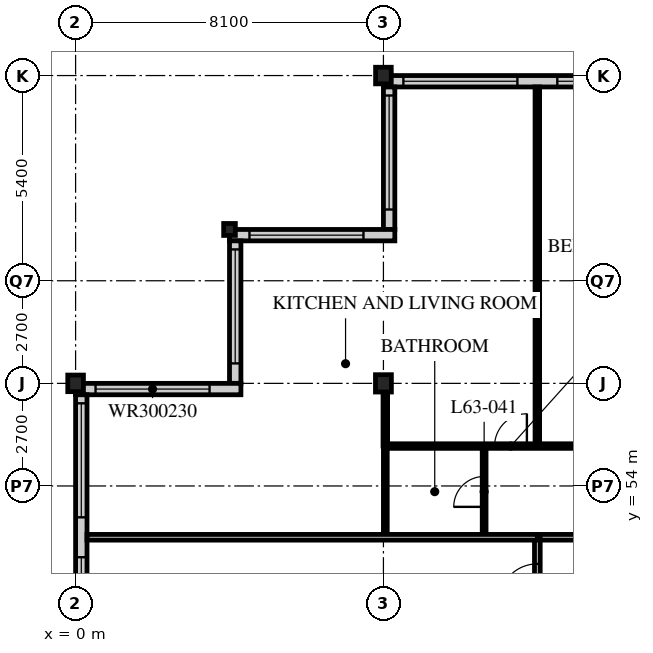
"""IFC4 building model, lengths in metres.
Left out: names, types, materials, properties, quantities, classifications, styles, units other than length and angle.
Written with IfcOpenShell. Run it as: python <this file> out.ifc"""

import sys

from ifc_helpers import new_model, si_unit, direction, frame, frame_2d, origin, origin_2d, place, context, subcontext, project, spatial, rectangle, i_section, extrude, element, fill, save


model = new_model("IFC4")
c1 = context("Model", 3, precision=1e-05, world=origin(), true_north=direction((0.0, 1.0)))
c2 = subcontext(c1, "Body", "Model", "MODEL_VIEW")
j1 = project(units=[si_unit("LENGTHUNIT", "METRE"), si_unit("PLANEANGLEUNIT", "RADIAN")], contexts=[c1])
p1 = place(None, origin())
s1 = spatial("IfcSite", under=j1, at=p1, CompositionType="ELEMENT")
p2 = place(p1, origin())
s2 = spatial("IfcBuilding", under=s1, at=p2, CompositionType="ELEMENT")
p3 = place(p2, frame((0.0, 0.0, 246.3)))
s3 = spatial("IfcBuildingStorey", under=s2, at=p3, CompositionType="ELEMENT", Elevation=246.3)
p4 = place(p3, frame((0.0, 56.7, 0.0), z_axis=(0.0, 0.0, 1.0), x_axis=(1.0, 0.0, 0.0)))
e1 = element("IfcColumn", 1, at=p4, inside=s3, PredefinedType="COLUMN", context=c2, shape_type="SweptSolid", body=[
    extrude(i_section(OverallWidth=0.412, OverallDepth=0.437, WebThickness=0.036, FlangeThickness=0.058, FilletRadius=0.015, at=origin_2d()), origin(), (0.0, 0.0, 1.0), 3.9),
])
p5 = place(p3, frame((4.05, 60.75, 0.0), z_axis=(0.0, 0.0, 1.0), x_axis=(1.0, 0.0, 0.0)))
e2 = element("IfcColumn", 2, at=p5, inside=s3, PredefinedType="COLUMN", context=c2, shape_type="SweptSolid", body=[
    extrude(i_section(OverallWidth=0.307, OverallDepth=0.314, WebThickness=0.012, FlangeThickness=0.019, FilletRadius=0.015, at=origin_2d()), origin(), (0.0, 0.0, 1.0), 3.9),
])
p6 = place(p3, frame((8.1, 56.7, 0.0), z_axis=(0.0, 0.0, 1.0), x_axis=(1.0, 0.0, 0.0)))
e3 = element("IfcColumn", 3, at=p6, inside=s3, PredefinedType="COLUMN", context=c2, shape_type="SweptSolid", body=[
    extrude(i_section(OverallWidth=0.418, OverallDepth=0.456, WebThickness=0.042, FlangeThickness=0.067, FilletRadius=0.015, at=origin_2d()), origin(), (0.0, 0.0, 1.0), 3.9),
])
p7 = place(p3, frame((8.1, 64.8, 0.0), z_axis=(0.0, 0.0, 1.0), x_axis=(1.0, 0.0, 0.0)))
e4 = element("IfcColumn", 4, at=p7, inside=s3, PredefinedType="COLUMN", context=c2, shape_type="SweptSolid", body=[
    extrude(i_section(OverallWidth=0.412, OverallDepth=0.437, WebThickness=0.036, FlangeThickness=0.058, FilletRadius=0.015, at=origin_2d()), origin(), (0.0, 0.0, 1.0), 3.9),
])
p8 = place(p3, frame((48.3, 64.65, 0.0), z_axis=(0.0, 0.0, 1.0), x_axis=(-1.0, 0.0, 0.0)))
e5 = element("IfcWall", 5, at=p8, inside=s3, PredefinedType="SOLIDWALL", context=c2, shape_type="SweptSolid", body=[
    extrude(rectangle(XDim=40.2, YDim=0.3, at=frame_2d((20.1, 0.0))), origin(), (0.0, 0.0, 1.0), 3.69),
])
p9 = place(p8, frame((0.225, 0.0, 0.6)))
e6 = element("IfcOpeningElement", 6, at=p9, cuts=e5, PredefinedType="OPENING", context=c2, shape_type="SweptSolid", body=[
    extrude(rectangle(XDim=3.0, YDim=2.4, at=frame_2d((1.5, 1.2))), frame((0.0, 0.16, 0.0), z_axis=(0.0, -1.0, 0.0), x_axis=(1.0, 0.0, 0.0)), (0.0, 0.0, 1.0), 0.32),
])
p10 = place(p8, frame((4.275, 0.0, 0.6)))
e7 = element("IfcOpeningElement", 7, at=p10, cuts=e5, PredefinedType="OPENING", context=c2, shape_type="SweptSolid", body=[
    extrude(rectangle(XDim=3.0, YDim=2.4, at=frame_2d((1.5, 1.2))), frame((0.0, 0.16, 0.0), z_axis=(0.0, -1.0, 0.0), x_axis=(1.0, 0.0, 0.0)), (0.0, 0.0, 1.0), 0.32),
])
p11 = place(p8, frame((8.325, 0.0, 0.6)))
e8 = element("IfcOpeningElement", 8, at=p11, cuts=e5, PredefinedType="OPENING", context=c2, shape_type="SweptSolid", body=[
    extrude(rectangle(XDim=3.0, YDim=2.4, at=frame_2d((1.5, 1.2))), frame((0.0, 0.16, 0.0), z_axis=(0.0, -1.0, 0.0), x_axis=(1.0, 0.0, 0.0)), (0.0, 0.0, 1.0), 0.32),
])
p12 = place(p8, frame((12.375, 0.0, 0.6)))
e9 = element("IfcOpeningElement", 9, at=p12, cuts=e5, PredefinedType="OPENING", context=c2, shape_type="SweptSolid", body=[
    extrude(rectangle(XDim=3.0, YDim=2.4, at=frame_2d((1.5, 1.2))), frame((0.0, 0.16, 0.0), z_axis=(0.0, -1.0, 0.0), x_axis=(1.0, 0.0, 0.0)), (0.0, 0.0, 1.0), 0.32),
])
p13 = place(p8, frame((16.425, 0.0, 0.6)))
e10 = element("IfcOpeningElement", 10, at=p13, cuts=e5, PredefinedType="OPENING", context=c2, shape_type="SweptSolid", body=[
    extrude(rectangle(XDim=3.0, YDim=2.4, at=frame_2d((1.5, 1.2))), frame((0.0, 0.16, 0.0), z_axis=(0.0, -1.0, 0.0), x_axis=(1.0, 0.0, 0.0)), (0.0, 0.0, 1.0), 0.32),
])
p14 = place(p8, frame((20.475, 0.0, 0.6)))
e11 = element("IfcOpeningElement", 11, at=p14, cuts=e5, PredefinedType="OPENING", context=c2, shape_type="SweptSolid", body=[
    extrude(rectangle(XDim=3.0, YDim=2.4, at=frame_2d((1.5, 1.2))), frame((0.0, 0.16, 0.0), z_axis=(0.0, -1.0, 0.0), x_axis=(1.0, 0.0, 0.0)), (0.0, 0.0, 1.0), 0.32),
])
p15 = place(p8, frame((24.525, 0.0, 0.6)))
e12 = element("IfcOpeningElement", 12, at=p15, cuts=e5, PredefinedType="OPENING", context=c2, shape_type="SweptSolid", body=[
    extrude(rectangle(XDim=3.0, YDim=2.4, at=frame_2d((1.5, 1.2))), frame((0.0, 0.16, 0.0), z_axis=(0.0, -1.0, 0.0), x_axis=(1.0, 0.0, 0.0)), (0.0, 0.0, 1.0), 0.32),
])
p16 = place(p8, frame((28.575, 0.0, 0.6)))
e13 = element("IfcOpeningElement", 13, at=p16, cuts=e5, PredefinedType="OPENING", context=c2, shape_type="SweptSolid", body=[
    extrude(rectangle(XDim=3.0, YDim=2.4, at=frame_2d((1.5, 1.2))), frame((0.0, 0.16, 0.0), z_axis=(0.0, -1.0, 0.0), x_axis=(1.0, 0.0, 0.0)), (0.0, 0.0, 1.0), 0.32),
])
p17 = place(p8, frame((32.625, 0.0, 0.6)))
e14 = element("IfcOpeningElement", 14, at=p17, cuts=e5, PredefinedType="OPENING", context=c2, shape_type="SweptSolid", body=[
    extrude(rectangle(XDim=3.0, YDim=2.4, at=frame_2d((1.5, 1.2))), frame((0.0, 0.16, 0.0), z_axis=(0.0, -1.0, 0.0), x_axis=(1.0, 0.0, 0.0)), (0.0, 0.0, 1.0), 0.32),
])
p18 = place(p8, frame((36.675, 0.0, 0.6)))
e15 = element("IfcOpeningElement", 15, at=p18, cuts=e5, PredefinedType="OPENING", context=c2, shape_type="SweptSolid", body=[
    extrude(rectangle(XDim=3.0, YDim=2.4, at=frame_2d((1.5, 1.2))), frame((0.0, 0.16, 0.0), z_axis=(0.0, -1.0, 0.0), x_axis=(1.0, 0.0, 0.0)), (0.0, 0.0, 1.0), 0.32),
])
p19 = place(p3, frame((8.25, 64.5, 0.0), z_axis=(0.0, 0.0, 1.0), x_axis=(0.0, -1.0, 0.0)))
e16 = element("IfcWall", 16, at=p19, inside=s3, PredefinedType="SOLIDWALL", context=c2, shape_type="SweptSolid", body=[
    extrude(rectangle(XDim=3.75, YDim=0.3, at=frame_2d((1.875, 0.0))), origin(), (0.0, 0.0, 1.0), 3.69),
])
p20 = place(p19, frame((0.225, 0.0, 0.6)))
e17 = element("IfcOpeningElement", 17, at=p20, cuts=e16, PredefinedType="OPENING", context=c2, shape_type="SweptSolid", body=[
    extrude(rectangle(XDim=3.0, YDim=2.3, at=frame_2d((1.5, 1.15))), frame((0.0, 0.16, 0.0), z_axis=(0.0, -1.0, 0.0), x_axis=(1.0, 0.0, 0.0)), (0.0, 0.0, 1.0), 0.32),
])
p21 = place(p3, frame((8.4, 60.6, 0.0), z_axis=(0.0, 0.0, 1.0), x_axis=(-1.0, 0.0, 0.0)))
e18 = element("IfcWall", 18, at=p21, inside=s3, PredefinedType="SOLIDWALL", context=c2, shape_type="SweptSolid", body=[
    extrude(rectangle(XDim=4.35, YDim=0.3, at=frame_2d((2.175, 0.0))), origin(), (0.0, 0.0, 1.0), 3.69),
])
p22 = place(p21, frame((0.825, 0.0, 0.6)))
e19 = element("IfcOpeningElement", 19, at=p22, cuts=e18, PredefinedType="OPENING", context=c2, shape_type="SweptSolid", body=[
    extrude(rectangle(XDim=3.0, YDim=2.3, at=frame_2d((1.5, 1.15))), frame((0.0, 0.16, 0.0), z_axis=(0.0, -1.0, 0.0), x_axis=(1.0, 0.0, 0.0)), (0.0, 0.0, 1.0), 0.32),
])
p23 = place(p3, frame((4.2, 60.45, 0.0), z_axis=(0.0, 0.0, 1.0), x_axis=(0.0, -1.0, 0.0)))
e20 = element("IfcWall", 20, at=p23, inside=s3, PredefinedType="SOLIDWALL", context=c2, shape_type="SweptSolid", body=[
    extrude(rectangle(XDim=3.75, YDim=0.3, at=frame_2d((1.875, 0.0))), origin(), (0.0, 0.0, 1.0), 3.69),
])
p24 = place(p23, frame((0.225, 0.0, 0.6)))
e21 = element("IfcOpeningElement", 21, at=p24, cuts=e20, PredefinedType="OPENING", context=c2, shape_type="SweptSolid", body=[
    extrude(rectangle(XDim=3.0, YDim=2.3, at=frame_2d((1.5, 1.15))), frame((0.0, 0.16, 0.0), z_axis=(0.0, -1.0, 0.0), x_axis=(1.0, 0.0, 0.0)), (0.0, 0.0, 1.0), 0.32),
])
p25 = place(p3, frame((4.35, 56.55, 0.0), z_axis=(0.0, 0.0, 1.0), x_axis=(-1.0, 0.0, 0.0)))
e22 = element("IfcWall", 22, at=p25, inside=s3, PredefinedType="SOLIDWALL", context=c2, shape_type="SweptSolid", body=[
    extrude(rectangle(XDim=4.35, YDim=0.3, at=frame_2d((2.175, 0.0))), origin(), (0.0, 0.0, 1.0), 3.69),
])
p26 = place(p25, frame((0.825, 0.0, 0.6)))
e23 = element("IfcOpeningElement", 23, at=p26, cuts=e22, PredefinedType="OPENING", context=c2, shape_type="SweptSolid", body=[
    extrude(rectangle(XDim=3.0, YDim=2.3, at=frame_2d((1.5, 1.15))), frame((0.0, 0.16, 0.0), z_axis=(0.0, -1.0, 0.0), x_axis=(1.0, 0.0, 0.0)), (0.0, 0.0, 1.0), 0.32),
])
p27 = place(p3, frame((0.15, 56.4, 0.0), z_axis=(0.0, 0.0, 1.0), x_axis=(0.0, -1.0, 0.0)))
e24 = element("IfcWall", 24, at=p27, inside=s3, PredefinedType="SOLIDWALL", context=c2, shape_type="SweptSolid", body=[
    extrude(rectangle(XDim=32.1, YDim=0.3, at=frame_2d((16.05, 0.0))), origin(), (0.0, 0.0, 1.0), 3.69),
])
p28 = place(p27, frame((0.225, 0.0, 0.6)))
e25 = element("IfcOpeningElement", 25, at=p28, cuts=e24, PredefinedType="OPENING", context=c2, shape_type="SweptSolid", body=[
    extrude(rectangle(XDim=3.0, YDim=2.4, at=frame_2d((1.5, 1.2))), frame((0.0, 0.16, 0.0), z_axis=(0.0, -1.0, 0.0), x_axis=(1.0, 0.0, 0.0)), (0.0, 0.0, 1.0), 0.32),
])
p29 = place(p27, frame((4.275, 0.0, 0.6)))
e26 = element("IfcOpeningElement", 26, at=p29, cuts=e24, PredefinedType="OPENING", context=c2, shape_type="SweptSolid", body=[
    extrude(rectangle(XDim=3.0, YDim=2.4, at=frame_2d((1.5, 1.2))), frame((0.0, 0.16, 0.0), z_axis=(0.0, -1.0, 0.0), x_axis=(1.0, 0.0, 0.0)), (0.0, 0.0, 1.0), 0.32),
])
p30 = place(p27, frame((8.325, 0.0, 0.6)))
e27 = element("IfcOpeningElement", 27, at=p30, cuts=e24, PredefinedType="OPENING", context=c2, shape_type="SweptSolid", body=[
    extrude(rectangle(XDim=3.0, YDim=2.4, at=frame_2d((1.5, 1.2))), frame((0.0, 0.16, 0.0), z_axis=(0.0, -1.0, 0.0), x_axis=(1.0, 0.0, 0.0)), (0.0, 0.0, 1.0), 0.32),
])
p31 = place(p27, frame((12.375, 0.0, 0.6)))
e28 = element("IfcOpeningElement", 28, at=p31, cuts=e24, PredefinedType="OPENING", context=c2, shape_type="SweptSolid", body=[
    extrude(rectangle(XDim=3.0, YDim=2.4, at=frame_2d((1.5, 1.2))), frame((0.0, 0.16, 0.0), z_axis=(0.0, -1.0, 0.0), x_axis=(1.0, 0.0, 0.0)), (0.0, 0.0, 1.0), 0.32),
])
p32 = place(p27, frame((16.425, 0.0, 0.6)))
e29 = element("IfcOpeningElement", 29, at=p32, cuts=e24, PredefinedType="OPENING", context=c2, shape_type="SweptSolid", body=[
    extrude(rectangle(XDim=3.0, YDim=2.4, at=frame_2d((1.5, 1.2))), frame((0.0, 0.16, 0.0), z_axis=(0.0, -1.0, 0.0), x_axis=(1.0, 0.0, 0.0)), (0.0, 0.0, 1.0), 0.32),
])
p33 = place(p27, frame((20.475, 0.0, 0.6)))
e30 = element("IfcOpeningElement", 30, at=p33, cuts=e24, PredefinedType="OPENING", context=c2, shape_type="SweptSolid", body=[
    extrude(rectangle(XDim=3.0, YDim=2.4, at=frame_2d((1.5, 1.2))), frame((0.0, 0.16, 0.0), z_axis=(0.0, -1.0, 0.0), x_axis=(1.0, 0.0, 0.0)), (0.0, 0.0, 1.0), 0.32),
])
p34 = place(p27, frame((24.525, 0.0, 0.6)))
e31 = element("IfcOpeningElement", 31, at=p34, cuts=e24, PredefinedType="OPENING", context=c2, shape_type="SweptSolid", body=[
    extrude(rectangle(XDim=3.0, YDim=2.4, at=frame_2d((1.5, 1.2))), frame((0.0, 0.16, 0.0), z_axis=(0.0, -1.0, 0.0), x_axis=(1.0, 0.0, 0.0)), (0.0, 0.0, 1.0), 0.32),
])
p35 = place(p27, frame((28.575, 0.0, 0.6)))
e32 = element("IfcOpeningElement", 32, at=p35, cuts=e24, PredefinedType="OPENING", context=c2, shape_type="SweptSolid", body=[
    extrude(rectangle(XDim=3.0, YDim=2.4, at=frame_2d((1.5, 1.2))), frame((0.0, 0.16, 0.0), z_axis=(0.0, -1.0, 0.0), x_axis=(1.0, 0.0, 0.0)), (0.0, 0.0, 1.0), 0.32),
])
p36 = place(p3, frame((12.15, 52.65, 0.0), z_axis=(0.0, 0.0, 1.0), x_axis=(1.0, 0.0, 0.0)))
e33 = element("IfcWall", 33, at=p36, inside=s3, PredefinedType="PARTITIONING", context=c2, shape_type="SweptSolid", body=[
    extrude(rectangle(XDim=24.3, YDim=0.15, at=frame_2d((12.15, 0.0))), origin(), (0.0, 0.0, 1.0), 3.69),
])
p37 = place(p36, frame((4.45, 0.0, 0.0)))
e34 = element("IfcOpeningElement", 34, at=p37, cuts=e33, PredefinedType="OPENING", context=c2, shape_type="SweptSolid", body=[
    extrude(rectangle(XDim=1.0, YDim=2.1, at=frame_2d((0.5, 1.05))), frame((0.0, 0.085, 0.0), z_axis=(0.0, -1.0, 0.0), x_axis=(1.0, 0.0, 0.0)), (0.0, 0.0, 1.0), 0.17),
])
p38 = place(p36, frame((1.525, 0.0, 0.0)))
e35 = element("IfcOpeningElement", 35, at=p38, cuts=e33, PredefinedType="OPENING", context=c2, shape_type="SweptSolid", body=[
    extrude(rectangle(XDim=1.0, YDim=2.1, at=frame_2d((0.5, 1.05))), frame((0.0, 0.085, 0.0), z_axis=(0.0, -1.0, 0.0), x_axis=(1.0, 0.0, 0.0)), (0.0, 0.0, 1.0), 0.17),
])
p39 = place(p3, frame((12.15, 22.5, 0.0), z_axis=(0.0, 0.0, 1.0), x_axis=(0.0, 1.0, 0.0)))
e36 = element("IfcWall", 36, at=p39, inside=s3, PredefinedType="PARTITIONING", context=c2, shape_type="SweptSolid", body=[
    extrude(rectangle(XDim=30.15, YDim=0.15, at=frame_2d((15.075, 0.0))), origin(), (0.0, 0.0, 1.0), 3.69),
])
p40 = place(p39, frame((0.4, 0.0, 0.0)))
e37 = element("IfcOpeningElement", 37, at=p40, cuts=e36, PredefinedType="OPENING", context=c2, shape_type="SweptSolid", body=[
    extrude(rectangle(XDim=1.0, YDim=2.1, at=frame_2d((0.5, 1.05))), frame((0.0, 0.085, 0.0), z_axis=(0.0, -1.0, 0.0), x_axis=(1.0, 0.0, 0.0)), (0.0, 0.0, 1.0), 0.17),
])
p41 = place(p39, frame((24.4, 0.0, 0.0)))
e38 = element("IfcOpeningElement", 38, at=p41, cuts=e36, PredefinedType="OPENING", context=c2, shape_type="SweptSolid", body=[
    extrude(rectangle(XDim=1.0, YDim=2.1, at=frame_2d((0.5, 1.05))), frame((0.0, 0.085, 0.0), z_axis=(0.0, -1.0, 0.0), x_axis=(1.0, 0.0, 0.0)), (0.0, 0.0, 1.0), 0.17),
])
p42 = place(p39, frame((28.45, 0.0, 0.0)))
e39 = element("IfcOpeningElement", 39, at=p42, cuts=e36, PredefinedType="OPENING", context=c2, shape_type="SweptSolid", body=[
    extrude(rectangle(XDim=1.0, YDim=2.1, at=frame_2d((0.5, 1.05))), frame((0.0, 0.085, 0.0), z_axis=(0.0, -1.0, 0.0), x_axis=(1.0, 0.0, 0.0)), (0.0, 0.0, 1.0), 0.17),
])
p43 = place(p3, frame((10.75, 52.65, 0.0), z_axis=(0.0, 0.0, 1.0), x_axis=(0.0, 1.0, 0.0)))
e40 = element("IfcWall", 40, at=p43, inside=s3, PredefinedType="PARTITIONING", context=c2, shape_type="SweptSolid", body=[
    extrude(rectangle(XDim=2.4, YDim=0.1, at=frame_2d((1.2, 0.0))), origin(), (0.0, 0.0, 1.0), 3.69),
])
p44 = place(p43, frame((0.8, 0.0, 0.0)))
e41 = element("IfcOpeningElement", 41, at=p44, cuts=e40, PredefinedType="OPENING", context=c2, shape_type="SweptSolid", body=[
    extrude(rectangle(XDim=0.8, YDim=2.1, at=frame_2d((0.4, 1.05))), frame((0.0, 0.06, 0.0), z_axis=(0.0, -1.0, 0.0), x_axis=(1.0, 0.0, 0.0)), (0.0, 0.0, 1.0), 0.12),
])
p45 = place(p3, frame((8.15, 52.65, 0.0), z_axis=(0.0, 0.0, 1.0), x_axis=(0.0, 1.0, 0.0)))
e42 = element("IfcWall", 42, at=p45, inside=s3, PredefinedType="PARTITIONING", context=c2, shape_type="SweptSolid", body=[
    extrude(rectangle(XDim=2.4, YDim=0.1, at=frame_2d((1.2, 0.0))), origin(), (0.0, 0.0, 1.0), 3.078),
])
p46 = place(p3, frame((8.15, 55.05, 0.0), z_axis=(0.0, 0.0, 1.0), x_axis=(1.0, 0.0, 0.0)))
e43 = element("IfcWall", 43, at=p46, inside=s3, PredefinedType="PARTITIONING", context=c2, shape_type="SweptSolid", body=[
    extrude(rectangle(XDim=28.3, YDim=0.12, at=frame_2d((14.15, 0.0))), origin(), (0.0, 0.0, 1.0), 3.69),
])
p47 = place(p46, frame((9.025, 0.0, 0.0)))
e44 = element("IfcOpeningElement", 44, at=p47, cuts=e43, PredefinedType="OPENING", context=c2, shape_type="SweptSolid", body=[
    extrude(rectangle(XDim=0.85, YDim=2.1, at=frame_2d((0.425, 1.05))), frame((0.0, 0.07, 0.0), z_axis=(0.0, -1.0, 0.0), x_axis=(1.0, 0.0, 0.0)), (0.0, 0.0, 1.0), 0.14),
])
p48 = place(p46, frame((16.475, 0.0, 0.0)))
e45 = element("IfcOpeningElement", 45, at=p48, cuts=e43, PredefinedType="OPENING", context=c2, shape_type="SweptSolid", body=[
    extrude(rectangle(XDim=0.85, YDim=2.1, at=frame_2d((0.425, 1.05))), frame((0.0, 0.07, 0.0), z_axis=(0.0, -1.0, 0.0), x_axis=(1.0, 0.0, 0.0)), (0.0, 0.0, 1.0), 0.14),
])
p49 = place(p46, frame((20.525, 0.0, 0.0)))
e46 = element("IfcOpeningElement", 46, at=p49, cuts=e43, PredefinedType="OPENING", context=c2, shape_type="SweptSolid", body=[
    extrude(rectangle(XDim=0.85, YDim=2.1, at=frame_2d((0.425, 1.05))), frame((0.0, 0.07, 0.0), z_axis=(0.0, -1.0, 0.0), x_axis=(1.0, 0.0, 0.0)), (0.0, 0.0, 1.0), 0.14),
])
p50 = place(p46, frame((24.575, 0.0, 0.0)))
e47 = element("IfcOpeningElement", 47, at=p50, cuts=e43, PredefinedType="OPENING", context=c2, shape_type="SweptSolid", body=[
    extrude(rectangle(XDim=0.85, YDim=2.1, at=frame_2d((0.425, 1.05))), frame((0.0, 0.07, 0.0), z_axis=(0.0, -1.0, 0.0), x_axis=(1.0, 0.0, 0.0)), (0.0, 0.0, 1.0), 0.14),
])
p51 = place(p46, frame((6.725, 0.0, 0.0)))
e48 = element("IfcOpeningElement", 48, at=p51, cuts=e43, PredefinedType="OPENING", context=c2, shape_type="SweptSolid", body=[
    extrude(rectangle(XDim=0.85, YDim=2.1, at=frame_2d((0.425, 1.05))), frame((0.0, 0.07, 0.0), z_axis=(0.0, -1.0, 0.0), x_axis=(1.0, 0.0, 0.0)), (0.0, 0.0, 1.0), 0.14),
])
p52 = place(p46, frame((2.875, 0.0, 0.0)))
e49 = element("IfcOpeningElement", 49, at=p52, cuts=e43, PredefinedType="OPENING", context=c2, shape_type="SweptSolid", body=[
    extrude(rectangle(XDim=0.85, YDim=2.1, at=frame_2d((0.425, 1.05))), frame((0.0, 0.07, 0.0), z_axis=(0.0, -1.0, 0.0), x_axis=(1.0, 0.0, 0.0)), (0.0, 0.0, 1.0), 0.14),
])
p53 = place(p3, frame((12.15, 55.05, 0.0), z_axis=(0.0, 0.0, 1.0), x_axis=(0.0, 1.0, 0.0)))
e50 = element("IfcWall", 50, at=p53, inside=s3, PredefinedType="PARTITIONING", context=c2, shape_type="SweptSolid", body=[
    extrude(rectangle(XDim=9.45, YDim=0.12, at=frame_2d((4.725, 0.0))), origin(), (0.0, 0.0, 1.0), 3.69),
])
p54 = place(p3, frame((0.3, 52.65, 0.0), z_axis=(0.0, 0.0, 1.0), x_axis=(1.0, 0.0, 0.0)))
e51 = element("IfcWall", 51, at=p54, inside=s3, PredefinedType="PARTITIONING", context=c2, shape_type="SweptSolid", body=[
    extrude(rectangle(XDim=11.85, YDim=0.15, at=frame_2d((5.925, 0.0))), origin(), (0.0, 0.0, 1.0), 3.69),
])
p55 = place(p3, frame((8.15, 55.05, 0.0), z_axis=(0.0, 0.0, 1.0), x_axis=(0.0, 1.0, 0.0)))
e52 = element("IfcWall", 52, at=p55, inside=s3, PredefinedType="PARTITIONING", context=c2, shape_type="SweptSolid", body=[
    extrude(rectangle(XDim=1.447, YDim=0.12, at=frame_2d((0.724, 0.0))), origin(), (0.0, 0.0, 1.0), 3.078),
])
p56 = place(p17, origin())
e53 = element("IfcWindow", 53, at=p56, inside=s3, PartitioningType="SINGLE_PANEL", PredefinedType="WINDOW", context=c2, shape_type="SweptSolid", body=[
    extrude(rectangle(XDim=3.0, YDim=2.4, at=frame_2d((1.5, 1.2))), frame((0.0, 0.03, 0.0), z_axis=(0.0, -1.0, 0.0), x_axis=(1.0, 0.0, 0.0)), (0.0, 0.0, 1.0), 0.06),
])
fill(e14, e53)
p57 = place(p18, origin())
e54 = element("IfcWindow", 54, at=p57, inside=s3, PartitioningType="SINGLE_PANEL", PredefinedType="WINDOW", context=c2, shape_type="SweptSolid", body=[
    extrude(rectangle(XDim=3.0, YDim=2.4, at=frame_2d((1.5, 1.2))), frame((0.0, 0.03, 0.0), z_axis=(0.0, -1.0, 0.0), x_axis=(1.0, 0.0, 0.0)), (0.0, 0.0, 1.0), 0.06),
])
fill(e15, e54)
p58 = place(p20, origin())
e55 = element("IfcWindow", 55, at=p58, inside=s3, PartitioningType="SINGLE_PANEL", PredefinedType="WINDOW", context=c2, shape_type="SweptSolid", body=[
    extrude(rectangle(XDim=3.0, YDim=2.3, at=frame_2d((1.5, 1.15))), frame((0.0, 0.03, 0.0), z_axis=(0.0, -1.0, 0.0), x_axis=(1.0, 0.0, 0.0)), (0.0, 0.0, 1.0), 0.06),
])
fill(e17, e55)
p59 = place(p22, origin())
e56 = element("IfcWindow", 56, at=p59, inside=s3, PartitioningType="SINGLE_PANEL", PredefinedType="WINDOW", context=c2, shape_type="SweptSolid", body=[
    extrude(rectangle(XDim=3.0, YDim=2.3, at=frame_2d((1.5, 1.15))), frame((0.0, 0.03, 0.0), z_axis=(0.0, -1.0, 0.0), x_axis=(1.0, 0.0, 0.0)), (0.0, 0.0, 1.0), 0.06),
])
fill(e19, e56)
p60 = place(p24, origin())
e57 = element("IfcWindow", 57, at=p60, inside=s3, PartitioningType="SINGLE_PANEL", PredefinedType="WINDOW", context=c2, shape_type="SweptSolid", body=[
    extrude(rectangle(XDim=3.0, YDim=2.3, at=frame_2d((1.5, 1.15))), frame((0.0, 0.03, 0.0), z_axis=(0.0, -1.0, 0.0), x_axis=(1.0, 0.0, 0.0)), (0.0, 0.0, 1.0), 0.06),
])
fill(e21, e57)
p61 = place(p26, origin())
e58 = element("IfcWindow", 58, at=p61, inside=s3, PartitioningType="SINGLE_PANEL", PredefinedType="WINDOW", context=c2, shape_type="SweptSolid", body=[
    extrude(rectangle(XDim=3.0, YDim=2.3, at=frame_2d((1.5, 1.15))), frame((0.0, 0.03, 0.0), z_axis=(0.0, -1.0, 0.0), x_axis=(1.0, 0.0, 0.0)), (0.0, 0.0, 1.0), 0.06),
])
fill(e23, e58)
p62 = place(p28, origin())
e59 = element("IfcWindow", 59, at=p62, inside=s3, PartitioningType="SINGLE_PANEL", PredefinedType="WINDOW", context=c2, shape_type="SweptSolid", body=[
    extrude(rectangle(XDim=3.0, YDim=2.4, at=frame_2d((1.5, 1.2))), frame((0.0, 0.03, 0.0), z_axis=(0.0, -1.0, 0.0), x_axis=(1.0, 0.0, 0.0)), (0.0, 0.0, 1.0), 0.06),
])
fill(e25, e59)
p63 = place(p29, origin())
e60 = element("IfcWindow", 60, at=p63, inside=s3, PartitioningType="SINGLE_PANEL", PredefinedType="WINDOW", context=c2, shape_type="SweptSolid", body=[
    extrude(rectangle(XDim=3.0, YDim=2.4, at=frame_2d((1.5, 1.2))), frame((0.0, 0.03, 0.0), z_axis=(0.0, -1.0, 0.0), x_axis=(1.0, 0.0, 0.0)), (0.0, 0.0, 1.0), 0.06),
])
fill(e26, e60)
p64 = place(p42, origin())
e61 = element("IfcDoor", 61, at=p64, inside=s3, OperationType="SINGLE_SWING_LEFT", PredefinedType="DOOR", context=c2, shape_type="SweptSolid", body=[
    extrude(rectangle(XDim=1.0, YDim=2.1, at=frame_2d((0.5, 1.05))), frame((0.0, 0.025, 0.0), z_axis=(0.0, -1.0, 0.0), x_axis=(1.0, 0.0, 0.0)), (0.0, 0.0, 1.0), 0.05),
])
fill(e39, e61)
p65 = place(p44, origin())
e62 = element("IfcDoor", 62, at=p65, inside=s3, OperationType="SINGLE_SWING_LEFT", PredefinedType="DOOR", context=c2, shape_type="SweptSolid", body=[
    extrude(rectangle(XDim=0.8, YDim=2.1, at=frame_2d((0.4, 1.05))), frame((0.0, 0.025, 0.0), z_axis=(0.0, -1.0, 0.0), x_axis=(1.0, 0.0, 0.0)), (0.0, 0.0, 1.0), 0.05),
])
fill(e41, e62)
p66 = place(p52, origin())
e63 = element("IfcDoor", 63, at=p66, inside=s3, OperationType="SINGLE_SWING_RIGHT", PredefinedType="DOOR", context=c2, shape_type="SweptSolid", body=[
    extrude(rectangle(XDim=0.85, YDim=2.1, at=frame_2d((0.425, 1.05))), frame((0.0, 0.025, 0.0), z_axis=(0.0, -1.0, 0.0), x_axis=(1.0, 0.0, 0.0)), (0.0, 0.0, 1.0), 0.05),
])
fill(e49, e63)
save(model, sys.argv[1])
